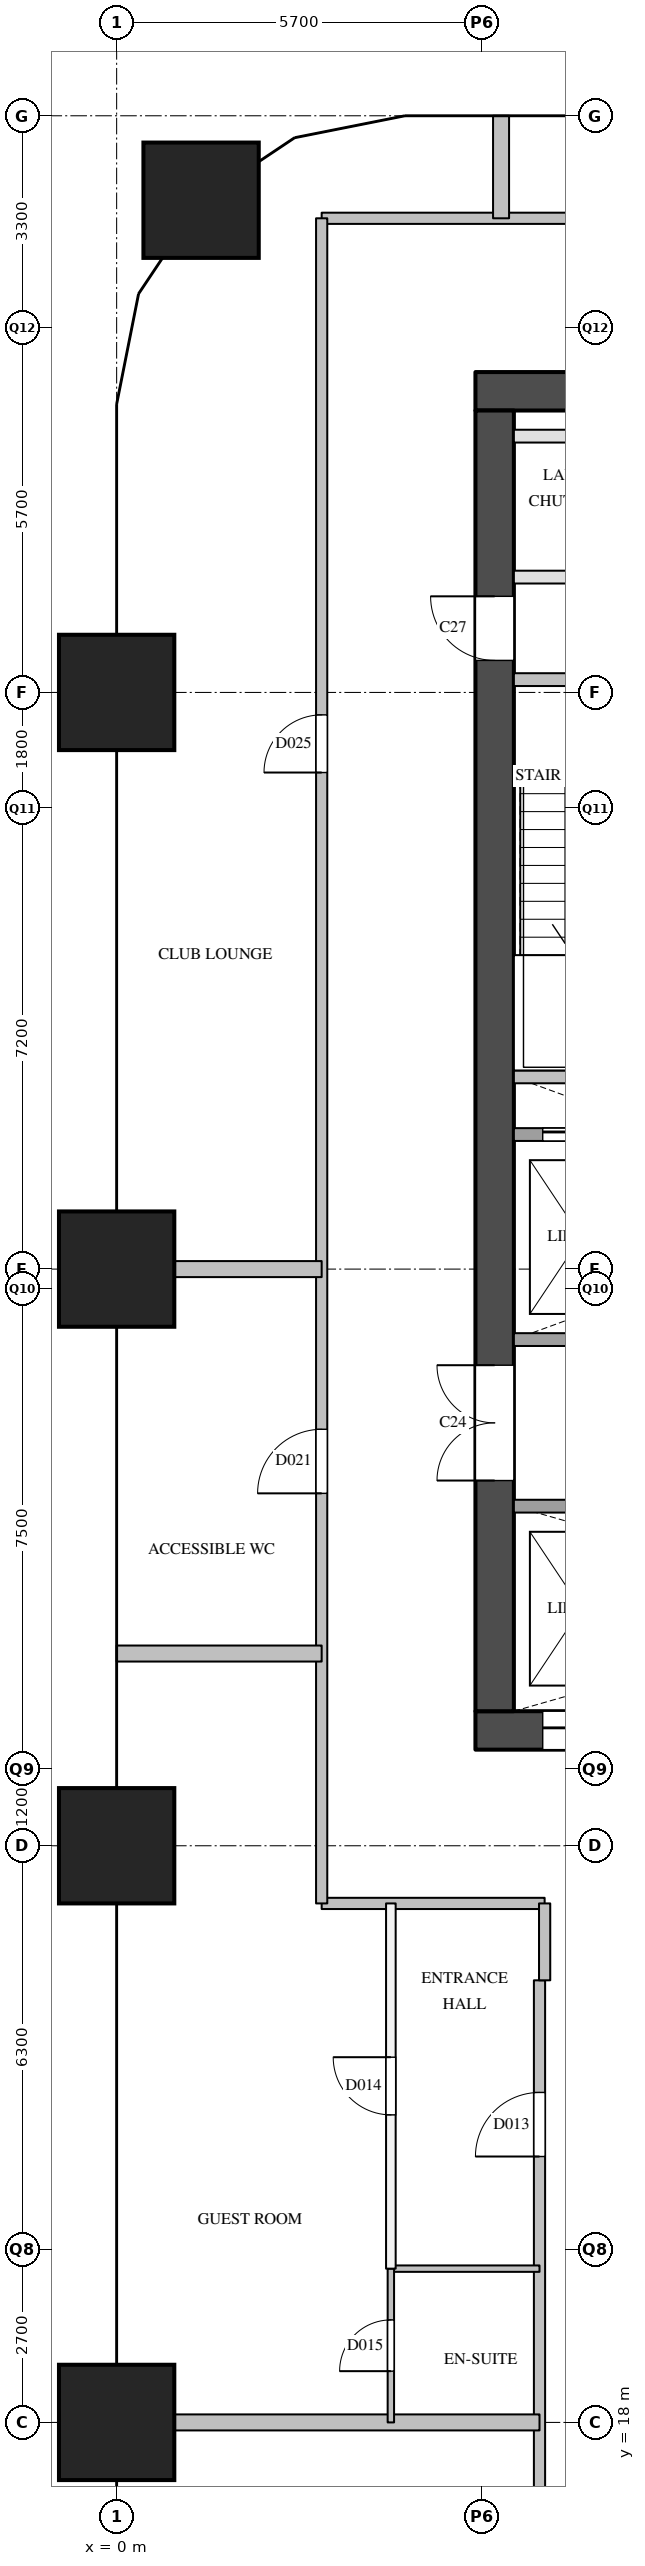
"""IFC4 building model, lengths in metres.
Left out: names, types, materials, properties, quantities, classifications, styles, units other than length and angle.
Written with IfcOpenShell. Run it as: python <this file> out.ifc"""

import sys

from ifc_helpers import new_model, si_unit, direction, frame, frame_2d, origin, origin_2d, place, context, subcontext, project, spatial, rectangle, extrude, element, fill, save


model = new_model("IFC4")
c1 = context("Model", 3, precision=1e-05, world=origin(), true_north=direction((0.0, 1.0)))
c2 = subcontext(c1, "Body", "Model", "MODEL_VIEW")
j1 = project(units=[si_unit("LENGTHUNIT", "METRE"), si_unit("PLANEANGLEUNIT", "RADIAN")], contexts=[c1])
p1 = place(None, origin())
s1 = spatial("IfcSite", under=j1, at=p1, CompositionType="ELEMENT")
p2 = place(p1, origin())
s2 = spatial("IfcBuilding", under=s1, at=p2, CompositionType="ELEMENT")
p3 = place(p2, frame((0.0, 0.0, 65.2)))
s3 = spatial("IfcBuildingStorey", under=s2, at=p3, CompositionType="ELEMENT", Elevation=65.2)
for number, where, z_axis, x_axis in (
    (1, (0.0, 18.0, 0.0), (0.0, 0.0, 1.0), (1.0, 0.0, 0.0)),
    (2, (0.0, 27.0, 0.0), (0.0, 0.0, 1.0), (1.0, 0.0, 0.0)),
    (3, (0.0, 36.0, 0.0), (0.0, 0.0, 1.0), (1.0, 0.0, 0.0)),
    (4, (0.0, 45.0, 0.0), (0.0, 0.0, 1.0), (1.0, 0.0, 0.0)),
    (5, (1.318, 52.682, 0.0), (0.0, 0.0, 1.0), (1.0, 0.0, 0.0)),
):
    element("IfcColumn", number, at=place(p3, frame(where, z_axis=z_axis, x_axis=x_axis)), inside=s3, PredefinedType="COLUMN", context=c2, shape_type="SweptSolid", body=[
        extrude(rectangle(XDim=1.8, YDim=1.8, at=origin_2d()), origin(), (0.0, 0.0, 1.0), 3.8),
    ])
p4 = place(p3, frame((5.6, 28.8, 0.0), z_axis=(0.0, 0.0, 1.0), x_axis=(1.0, 0.0, 0.0)))
e6 = element("IfcWall", 6, at=p4, inside=s3, PredefinedType="SHEAR", context=c2, shape_type="SweptSolid", body=[
    extrude(rectangle(XDim=12.4, YDim=0.6, at=frame_2d((6.2, 0.0))), origin(), (0.0, 0.0, 1.0), 3.5),
])
p5 = place(p4, frame((1.05, 0.0, 0.0)))
e7 = element("IfcOpeningElement", 7, at=p5, cuts=e6, PredefinedType="OPENING", context=c2, shape_type="SweptSolid", body=[
    extrude(rectangle(XDim=1.2, YDim=2.1, at=frame_2d((0.6, 1.05))), frame((0.0, 0.31, 0.0), z_axis=(0.0, -1.0, 0.0), x_axis=(1.0, 0.0, 0.0)), (0.0, 0.0, 1.0), 0.62),
])
p6 = place(p4, frame((5.25, 0.0, 0.0)))
e8 = element("IfcOpeningElement", 8, at=p6, cuts=e6, PredefinedType="OPENING", context=c2, shape_type="SweptSolid", body=[
    extrude(rectangle(XDim=1.2, YDim=2.1, at=frame_2d((0.6, 1.05))), frame((0.0, 0.31, 0.0), z_axis=(0.0, -1.0, 0.0), x_axis=(1.0, 0.0, 0.0)), (0.0, 0.0, 1.0), 0.62),
])
p7 = place(p4, frame((7.35, 0.0, 0.0)))
e9 = element("IfcOpeningElement", 9, at=p7, cuts=e6, PredefinedType="OPENING", context=c2, shape_type="SweptSolid", body=[
    extrude(rectangle(XDim=1.2, YDim=2.1, at=frame_2d((0.6, 1.05))), frame((0.0, 0.31, 0.0), z_axis=(0.0, -1.0, 0.0), x_axis=(1.0, 0.0, 0.0)), (0.0, 0.0, 1.0), 0.62),
])
p8 = place(p3, frame((5.6, 49.7, 0.0), z_axis=(0.0, 0.0, 1.0), x_axis=(1.0, 0.0, 0.0)))
e10 = element("IfcWall", 10, at=p8, inside=s3, PredefinedType="SHEAR", context=c2, shape_type="SweptSolid", body=[
    extrude(rectangle(XDim=12.4, YDim=0.6, at=frame_2d((6.2, 0.0))), origin(), (0.0, 0.0, 1.0), 3.5),
])
p9 = place(p3, frame((5.9, 29.1, 0.0), z_axis=(0.0, 0.0, 1.0), x_axis=(0.0, 1.0, 0.0)))
e11 = element("IfcWall", 11, at=p9, inside=s3, PredefinedType="SHEAR", context=c2, shape_type="SweptSolid", body=[
    extrude(rectangle(XDim=20.3, YDim=0.6, at=frame_2d((10.15, 0.0))), origin(), (0.0, 0.0, 1.0), 3.5),
])
p10 = place(p9, frame((3.6, 0.0, 0.0)))
e12 = element("IfcOpeningElement", 12, at=p10, cuts=e11, PredefinedType="OPENING", context=c2, shape_type="SweptSolid", body=[
    extrude(rectangle(XDim=1.8, YDim=2.1, at=frame_2d((0.9, 1.05))), frame((0.0, 0.31, 0.0), z_axis=(0.0, -1.0, 0.0), x_axis=(1.0, 0.0, 0.0)), (0.0, 0.0, 1.0), 0.62),
])
p11 = place(p9, frame((16.4, 0.0, 0.0)))
e13 = element("IfcOpeningElement", 13, at=p11, cuts=e11, PredefinedType="OPENING", context=c2, shape_type="SweptSolid", body=[
    extrude(rectangle(XDim=1.0, YDim=2.1, at=frame_2d((0.5, 1.05))), frame((0.0, 0.31, 0.0), z_axis=(0.0, -1.0, 0.0), x_axis=(1.0, 0.0, 0.0)), (0.0, 0.0, 1.0), 0.62),
])
p12 = place(p3, frame((6.2, 32.3, 0.0), z_axis=(0.0, 0.0, 1.0), x_axis=(1.0, 0.0, 0.0)))
e14 = element("IfcWall", 14, at=p12, inside=s3, PredefinedType="SOLIDWALL", context=c2, shape_type="SweptSolid", body=[
    extrude(rectangle(XDim=11.2, YDim=0.2, at=frame_2d((5.6, 0.0))), origin(), (0.0, 0.0, 1.0), 3.5),
])
p13 = place(p12, frame((2.55, 0.0, 0.0)))
e15 = element("IfcOpeningElement", 15, at=p13, cuts=e14, PredefinedType="OPENING", context=c2, shape_type="SweptSolid", body=[
    extrude(rectangle(XDim=1.2, YDim=2.1, at=frame_2d((0.6, 1.05))), frame((0.0, 0.11, 0.0), z_axis=(0.0, -1.0, 0.0), x_axis=(1.0, 0.0, 0.0)), (0.0, 0.0, 1.0), 0.22),
])
p14 = place(p3, frame((6.2, 34.9, 0.0), z_axis=(0.0, 0.0, 1.0), x_axis=(1.0, 0.0, 0.0)))
e16 = element("IfcWall", 16, at=p14, inside=s3, PredefinedType="SOLIDWALL", context=c2, shape_type="SweptSolid", body=[
    extrude(rectangle(XDim=11.2, YDim=0.2, at=frame_2d((5.6, 0.0))), origin(), (0.0, 0.0, 1.0), 3.5),
])
p15 = place(p3, frame((6.2, 38.1, 0.0), z_axis=(0.0, 0.0, 1.0), x_axis=(1.0, 0.0, 0.0)))
e17 = element("IfcWall", 17, at=p15, inside=s3, PredefinedType="SOLIDWALL", context=c2, shape_type="SweptSolid", body=[
    extrude(rectangle(XDim=11.2, YDim=0.2, at=frame_2d((5.6, 0.0))), origin(), (0.0, 0.0, 1.0), 3.5),
])
p16 = place(p15, frame((0.45, 0.0, 0.0)))
e18 = element("IfcOpeningElement", 18, at=p16, cuts=e17, PredefinedType="OPENING", context=c2, shape_type="SweptSolid", body=[
    extrude(rectangle(XDim=1.2, YDim=2.1, at=frame_2d((0.6, 1.05))), frame((0.0, 0.11, 0.0), z_axis=(0.0, -1.0, 0.0), x_axis=(1.0, 0.0, 0.0)), (0.0, 0.0, 1.0), 0.22),
])
p17 = place(p15, frame((2.55, 0.0, 0.0)))
e19 = element("IfcOpeningElement", 19, at=p17, cuts=e17, PredefinedType="OPENING", context=c2, shape_type="SweptSolid", body=[
    extrude(rectangle(XDim=1.2, YDim=2.1, at=frame_2d((0.6, 1.05))), frame((0.0, 0.11, 0.0), z_axis=(0.0, -1.0, 0.0), x_axis=(1.0, 0.0, 0.0)), (0.0, 0.0, 1.0), 0.22),
])
p18 = place(p15, frame((4.65, 0.0, 0.0)))
e20 = element("IfcOpeningElement", 20, at=p18, cuts=e17, PredefinedType="OPENING", context=c2, shape_type="SweptSolid", body=[
    extrude(rectangle(XDim=1.2, YDim=2.1, at=frame_2d((0.6, 1.05))), frame((0.0, 0.11, 0.0), z_axis=(0.0, -1.0, 0.0), x_axis=(1.0, 0.0, 0.0)), (0.0, 0.0, 1.0), 0.22),
])
p19 = place(p15, frame((6.75, 0.0, 0.0)))
e21 = element("IfcOpeningElement", 21, at=p19, cuts=e17, PredefinedType="OPENING", context=c2, shape_type="SweptSolid", body=[
    extrude(rectangle(XDim=1.2, YDim=2.1, at=frame_2d((0.6, 1.05))), frame((0.0, 0.11, 0.0), z_axis=(0.0, -1.0, 0.0), x_axis=(1.0, 0.0, 0.0)), (0.0, 0.0, 1.0), 0.22),
])
p20 = place(p3, frame((6.2, 39.0, 0.0), z_axis=(0.0, 0.0, 1.0), x_axis=(1.0, 0.0, 0.0)))
e22 = element("IfcWall", 22, at=p20, inside=s3, PredefinedType="SOLIDWALL", context=c2, shape_type="SweptSolid", body=[
    extrude(rectangle(XDim=3.05, YDim=0.2, at=frame_2d((1.525, 0.0))), origin(), (0.0, 0.0, 1.0), 3.5),
])
p21 = place(p3, frame((6.2, 45.2, 0.0), z_axis=(0.0, 0.0, 1.0), x_axis=(1.0, 0.0, 0.0)))
e23 = element("IfcWall", 23, at=p21, inside=s3, PredefinedType="SOLIDWALL", context=c2, shape_type="SweptSolid", body=[
    extrude(rectangle(XDim=6.3, YDim=0.2, at=frame_2d((3.15, 0.0))), origin(), (0.0, 0.0, 1.0), 3.5),
])
p22 = place(p21, frame((1.025, 0.0, 0.0)))
e24 = element("IfcOpeningElement", 24, at=p22, cuts=e23, PredefinedType="OPENING", context=c2, shape_type="SweptSolid", body=[
    extrude(rectangle(XDim=1.1, YDim=2.1, at=frame_2d((0.55, 1.05))), frame((0.0, 0.11, 0.0), z_axis=(0.0, -1.0, 0.0), x_axis=(1.0, 0.0, 0.0)), (0.0, 0.0, 1.0), 0.22),
])
p23 = place(p21, frame((4.175, 0.0, 0.0)))
e25 = element("IfcOpeningElement", 25, at=p23, cuts=e23, PredefinedType="OPENING", context=c2, shape_type="SweptSolid", body=[
    extrude(rectangle(XDim=1.1, YDim=2.1, at=frame_2d((0.55, 1.05))), frame((0.0, 0.11, 0.0), z_axis=(0.0, -1.0, 0.0), x_axis=(1.0, 0.0, 0.0)), (0.0, 0.0, 1.0), 0.22),
])
p24 = place(p3, frame((6.2, 46.8, 0.0), z_axis=(0.0, 0.0, 1.0), x_axis=(1.0, 0.0, 0.0)))
e26 = element("IfcWall", 26, at=p24, inside=s3, PredefinedType="PARTITIONING", context=c2, shape_type="SweptSolid", body=[
    extrude(rectangle(XDim=11.2, YDim=0.2, at=frame_2d((5.6, 0.0))), origin(), (0.0, 0.0, 1.0), 3.5),
])
p25 = place(p24, frame((1.23, 0.0, 0.0)))
e27 = element("IfcOpeningElement", 27, at=p25, cuts=e26, PredefinedType="OPENING", context=c2, shape_type="SweptSolid", body=[
    extrude(rectangle(XDim=0.9, YDim=2.1, at=frame_2d((0.45, 1.05))), frame((0.0, 0.11, 0.0), z_axis=(0.0, -1.0, 0.0), x_axis=(1.0, 0.0, 0.0)), (0.0, 0.0, 1.0), 0.22),
])
p26 = place(p24, frame((6.83, 0.0, 0.0)))
e28 = element("IfcOpeningElement", 28, at=p26, cuts=e26, PredefinedType="OPENING", context=c2, shape_type="SweptSolid", body=[
    extrude(rectangle(XDim=0.9, YDim=2.1, at=frame_2d((0.45, 1.05))), frame((0.0, 0.11, 0.0), z_axis=(0.0, -1.0, 0.0), x_axis=(1.0, 0.0, 0.0)), (0.0, 0.0, 1.0), 0.22),
])
p27 = place(p3, frame((6.2, 49.0, 0.0), z_axis=(0.0, 0.0, 1.0), x_axis=(1.0, 0.0, 0.0)))
e29 = element("IfcWall", 29, at=p27, inside=s3, PredefinedType="PARTITIONING", context=c2, shape_type="SweptSolid", body=[
    extrude(rectangle(XDim=11.2, YDim=0.2, at=frame_2d((5.6, 0.0))), origin(), (0.0, 0.0, 1.0), 3.5),
])
p28 = place(p3, frame((6.6, 24.9, 0.0), z_axis=(0.0, 0.0, 1.0), x_axis=(1.0, 0.0, 0.0)))
e30 = element("IfcWall", 30, at=p28, inside=s3, PredefinedType="PARTITIONING", context=c2, shape_type="SweptSolid", body=[
    extrude(rectangle(XDim=0.08, YDim=0.175, at=frame_2d((0.04, 0.0))), origin(), (0.0, 0.0, 1.0), 3.5),
])
p29 = place(p3, frame((3.2, 26.1, 0.0), z_axis=(0.0, 0.0, 1.0), x_axis=(1.0, 0.0, 0.0)))
e31 = element("IfcWall", 31, at=p29, inside=s3, PredefinedType="PARTITIONING", context=c2, shape_type="SweptSolid", body=[
    extrude(rectangle(XDim=3.48, YDim=0.175, at=frame_2d((1.74, 0.0))), origin(), (0.0, 0.0, 1.0), 3.5),
])
p30 = place(p3, frame((3.2, 52.4, 0.0), z_axis=(0.0, 0.0, 1.0), x_axis=(1.0, 0.0, 0.0)))
e32 = element("IfcWall", 32, at=p30, inside=s3, PredefinedType="PARTITIONING", context=c2, shape_type="SweptSolid", body=[
    extrude(rectangle(XDim=17.2, YDim=0.175, at=frame_2d((8.6, 0.0))), origin(), (0.0, 0.0, 1.0), 3.5),
])
p31 = place(p30, frame((8.3, 0.0, 0.0)))
e33 = element("IfcOpeningElement", 33, at=p31, cuts=e32, PredefinedType="OPENING", context=c2, shape_type="SweptSolid", body=[
    extrude(rectangle(XDim=1.0, YDim=2.1, at=frame_2d((0.5, 1.05))), frame((0.0, 0.097, 0.0), z_axis=(0.0, -1.0, 0.0), x_axis=(1.0, 0.0, 0.0)), (0.0, 0.0, 1.0), 0.195),
])
p32 = place(p3, frame((3.2, 26.1, 0.0), z_axis=(0.0, 0.0, 1.0), x_axis=(0.0, 1.0, 0.0)))
e34 = element("IfcWall", 34, at=p32, inside=s3, PredefinedType="PARTITIONING", context=c2, shape_type="SweptSolid", body=[
    extrude(rectangle(XDim=26.3, YDim=0.175, at=frame_2d((13.15, 0.0))), origin(), (0.0, 0.0, 1.0), 2.5),
])
p33 = place(p32, frame((6.4, 0.0, 0.0)))
e35 = element("IfcOpeningElement", 35, at=p33, cuts=e34, PredefinedType="OPENING", context=c2, shape_type="SweptSolid", body=[
    extrude(rectangle(XDim=1.0, YDim=2.1, at=frame_2d((0.5, 1.05))), frame((0.0, 0.097, 0.0), z_axis=(0.0, -1.0, 0.0), x_axis=(1.0, 0.0, 0.0)), (0.0, 0.0, 1.0), 0.195),
])
p34 = place(p32, frame((17.65, 0.0, 0.0)))
e36 = element("IfcOpeningElement", 36, at=p34, cuts=e34, PredefinedType="OPENING", context=c2, shape_type="SweptSolid", body=[
    extrude(rectangle(XDim=0.9, YDim=2.1, at=frame_2d((0.45, 1.05))), frame((0.0, 0.097, 0.0), z_axis=(0.0, -1.0, 0.0), x_axis=(1.0, 0.0, 0.0)), (0.0, 0.0, 1.0), 0.195),
])
p35 = place(p3, frame((6.6, 6.6, 0.0), z_axis=(0.0, 0.0, 1.0), x_axis=(0.0, 1.0, 0.0)))
e37 = element("IfcWall", 37, at=p35, inside=s3, PredefinedType="PARTITIONING", context=c2, shape_type="SweptSolid", body=[
    extrude(rectangle(XDim=18.3, YDim=0.175, at=frame_2d((9.15, 0.0))), origin(), (0.0, 0.0, 1.0), 3.5),
])
p36 = place(p35, frame((5.25, 0.0, 0.0)))
e38 = element("IfcOpeningElement", 38, at=p36, cuts=e37, PredefinedType="OPENING", context=c2, shape_type="SweptSolid", body=[
    extrude(rectangle(XDim=0.9, YDim=2.1, at=frame_2d((0.45, 1.05))), frame((0.0, 0.097, 0.0), z_axis=(0.0, -1.0, 0.0), x_axis=(1.0, 0.0, 0.0)), (0.0, 0.0, 1.0), 0.195),
])
p37 = place(p35, frame((15.55, 0.0, 0.0)))
e39 = element("IfcOpeningElement", 39, at=p37, cuts=e37, PredefinedType="OPENING", context=c2, shape_type="SweptSolid", body=[
    extrude(rectangle(XDim=1.0, YDim=2.1, at=frame_2d((0.5, 1.05))), frame((0.0, 0.097, 0.0), z_axis=(0.0, -1.0, 0.0), x_axis=(1.0, 0.0, 0.0)), (0.0, 0.0, 1.0), 0.195),
])
p38 = place(p3, frame((6.68, 24.9, 0.0), z_axis=(0.0, 0.0, 1.0), x_axis=(0.0, 1.0, 0.0)))
e40 = element("IfcWall", 40, at=p38, inside=s3, PredefinedType="PARTITIONING", context=c2, shape_type="SweptSolid", body=[
    extrude(rectangle(XDim=1.2, YDim=0.175, at=frame_2d((0.6, 0.0))), origin(), (0.0, 0.0, 1.0), 3.5),
])
p39 = place(p3, frame((4.28, 20.4, 0.0), z_axis=(0.0, 0.0, 1.0), x_axis=(0.0, 1.0, 0.0)))
e41 = element("IfcWall", 41, at=p39, inside=s3, PredefinedType="PARTITIONING", context=c2, shape_type="SweptSolid", body=[
    extrude(rectangle(XDim=5.7, YDim=0.15, at=frame_2d((2.85, 0.0))), origin(), (0.0, 0.0, 1.0), 3.5),
])
p40 = place(p39, frame((2.4, 0.0, 0.0)))
e42 = element("IfcOpeningElement", 42, at=p40, cuts=e41, PredefinedType="OPENING", context=c2, shape_type="SweptSolid", body=[
    extrude(rectangle(XDim=0.9, YDim=2.1, at=frame_2d((0.45, 1.05))), frame((0.0, 0.085, 0.0), z_axis=(0.0, -1.0, 0.0), x_axis=(1.0, 0.0, 0.0)), (0.0, 0.0, 1.0), 0.17),
])
p41 = place(p3, frame((0.0, 18.0, 0.0), z_axis=(0.0, 0.0, 1.0), x_axis=(1.0, 0.0, 0.0)))
e43 = element("IfcWall", 43, at=p41, inside=s3, PredefinedType="PARTITIONING", context=c2, shape_type="SweptSolid", body=[
    extrude(rectangle(XDim=6.6, YDim=0.25, at=frame_2d((3.3, 0.0))), origin(), (0.0, 0.0, 1.0), 3.5),
])
p42 = place(p3, frame((0.0, 30.0, 0.0), z_axis=(0.0, 0.0, 1.0), x_axis=(1.0, 0.0, 0.0)))
e44 = element("IfcWall", 44, at=p42, inside=s3, PredefinedType="PARTITIONING", context=c2, shape_type="SweptSolid", body=[
    extrude(rectangle(XDim=3.2, YDim=0.25, at=frame_2d((1.6, 0.0))), origin(), (0.0, 0.0, 1.0), 2.5),
])
p43 = place(p3, frame((0.0, 36.0, 0.0), z_axis=(0.0, 0.0, 1.0), x_axis=(1.0, 0.0, 0.0)))
e45 = element("IfcWall", 45, at=p43, inside=s3, PredefinedType="PARTITIONING", context=c2, shape_type="SweptSolid", body=[
    extrude(rectangle(XDim=3.2, YDim=0.25, at=frame_2d((1.6, 0.0))), origin(), (0.0, 0.0, 1.0), 3.5),
])
p44 = place(p3, frame((6.0, 52.4, 0.0), z_axis=(0.0, 0.0, 1.0), x_axis=(0.0, 1.0, 0.0)))
e46 = element("IfcWall", 46, at=p44, inside=s3, PredefinedType="PARTITIONING", context=c2, shape_type="SweptSolid", body=[
    extrude(rectangle(XDim=1.6, YDim=0.25, at=frame_2d((0.8, 0.0))), origin(), (0.0, 0.0, 1.0), 2.5),
])
p45 = place(p3, frame((4.28, 20.4, 0.0), z_axis=(0.0, 0.0, 1.0), x_axis=(1.0, 0.0, 0.0)))
e47 = element("IfcWall", 47, at=p45, inside=s3, PredefinedType="PARTITIONING", context=c2, shape_type="SweptSolid", body=[
    extrude(rectangle(XDim=2.32, YDim=0.1, at=frame_2d((1.16, 0.0))), origin(), (0.0, 0.0, 1.0), 3.5),
])
p46 = place(p3, frame((4.28, 18.0, 0.0), z_axis=(0.0, 0.0, 1.0), x_axis=(0.0, 1.0, 0.0)))
e48 = element("IfcWall", 48, at=p46, inside=s3, PredefinedType="PARTITIONING", context=c2, shape_type="SweptSolid", body=[
    extrude(rectangle(XDim=2.4, YDim=0.1, at=frame_2d((1.2, 0.0))), origin(), (0.0, 0.0, 1.0), 3.5),
])
p47 = place(p46, frame((0.8, 0.0, 0.0)))
e49 = element("IfcOpeningElement", 49, at=p47, cuts=e48, PredefinedType="OPENING", context=c2, shape_type="SweptSolid", body=[
    extrude(rectangle(XDim=0.8, YDim=2.1, at=frame_2d((0.4, 1.05))), frame((0.0, 0.06, 0.0), z_axis=(0.0, -1.0, 0.0), x_axis=(1.0, 0.0, 0.0)), (0.0, 0.0, 1.0), 0.12),
])
p48 = place(p5, origin())
e50 = element("IfcDoor", 50, at=p48, inside=s3, OperationType="SLIDING_TO_LEFT", PredefinedType="DOOR", context=c2, shape_type="SweptSolid", body=[
    extrude(rectangle(XDim=1.2, YDim=2.1, at=frame_2d((0.6, 1.05))), frame((0.0, 0.025, 0.0), z_axis=(0.0, -1.0, 0.0), x_axis=(1.0, 0.0, 0.0)), (0.0, 0.0, 1.0), 0.05),
])
fill(e7, e50)
p49 = place(p16, origin())
e51 = element("IfcDoor", 51, at=p49, inside=s3, OperationType="SLIDING_TO_LEFT", PredefinedType="DOOR", context=c2, shape_type="SweptSolid", body=[
    extrude(rectangle(XDim=1.2, YDim=2.1, at=frame_2d((0.6, 1.05))), frame((0.0, 0.025, 0.0), z_axis=(0.0, -1.0, 0.0), x_axis=(1.0, 0.0, 0.0)), (0.0, 0.0, 1.0), 0.05),
])
fill(e18, e51)
p50 = place(p10, origin())
e52 = element("IfcDoor", 52, at=p50, inside=s3, OperationType="DOUBLE_DOOR_SINGLE_SWING", PredefinedType="DOOR", context=c2, shape_type="SweptSolid", body=[
    extrude(rectangle(XDim=1.8, YDim=2.1, at=frame_2d((0.9, 1.05))), frame((0.0, 0.025, 0.0), z_axis=(0.0, -1.0, 0.0), x_axis=(1.0, 0.0, 0.0)), (0.0, 0.0, 1.0), 0.05),
])
fill(e12, e52)
p51 = place(p11, origin())
e53 = element("IfcDoor", 53, at=p51, inside=s3, OperationType="SINGLE_SWING_RIGHT", PredefinedType="DOOR", context=c2, shape_type="SweptSolid", body=[
    extrude(rectangle(XDim=1.0, YDim=2.1, at=frame_2d((0.5, 1.05))), frame((0.0, 0.025, 0.0), z_axis=(0.0, -1.0, 0.0), x_axis=(1.0, 0.0, 0.0)), (0.0, 0.0, 1.0), 0.05),
])
fill(e13, e53)
p52 = place(p37, origin())
e54 = element("IfcDoor", 54, at=p52, inside=s3, OperationType="SINGLE_SWING_LEFT", PredefinedType="DOOR", context=c2, shape_type="SweptSolid", body=[
    extrude(rectangle(XDim=1.0, YDim=2.1, at=frame_2d((0.5, 1.05))), frame((0.0, 0.025, 0.0), z_axis=(0.0, -1.0, 0.0), x_axis=(1.0, 0.0, 0.0)), (0.0, 0.0, 1.0), 0.05),
])
fill(e39, e54)
p53 = place(p40, origin())
e55 = element("IfcDoor", 55, at=p53, inside=s3, OperationType="SINGLE_SWING_RIGHT", PredefinedType="DOOR", context=c2, shape_type="SweptSolid", body=[
    extrude(rectangle(XDim=0.9, YDim=2.1, at=frame_2d((0.45, 1.05))), frame((0.0, 0.025, 0.0), z_axis=(0.0, -1.0, 0.0), x_axis=(1.0, 0.0, 0.0)), (0.0, 0.0, 1.0), 0.05),
])
fill(e42, e55)
p54 = place(p47, origin())
e56 = element("IfcDoor", 56, at=p54, inside=s3, OperationType="SINGLE_SWING_LEFT", PredefinedType="DOOR", context=c2, shape_type="SweptSolid", body=[
    extrude(rectangle(XDim=0.8, YDim=2.1, at=frame_2d((0.4, 1.05))), frame((0.0, 0.025, 0.0), z_axis=(0.0, -1.0, 0.0), x_axis=(1.0, 0.0, 0.0)), (0.0, 0.0, 1.0), 0.05),
])
fill(e49, e56)
p55 = place(p33, origin())
e57 = element("IfcDoor", 57, at=p55, inside=s3, OperationType="SINGLE_SWING_LEFT", PredefinedType="DOOR", context=c2, shape_type="SweptSolid", body=[
    extrude(rectangle(XDim=1.0, YDim=2.1, at=frame_2d((0.5, 1.05))), frame((0.0, 0.025, 0.0), z_axis=(0.0, -1.0, 0.0), x_axis=(1.0, 0.0, 0.0)), (0.0, 0.0, 1.0), 0.05),
])
fill(e35, e57)
p56 = place(p34, origin())
e58 = element("IfcDoor", 58, at=p56, inside=s3, OperationType="SINGLE_SWING_LEFT", PredefinedType="DOOR", context=c2, shape_type="SweptSolid", body=[
    extrude(rectangle(XDim=0.9, YDim=2.1, at=frame_2d((0.45, 1.05))), frame((0.0, 0.025, 0.0), z_axis=(0.0, -1.0, 0.0), x_axis=(1.0, 0.0, 0.0)), (0.0, 0.0, 1.0), 0.05),
])
fill(e36, e58)
save(model, sys.argv[1])
